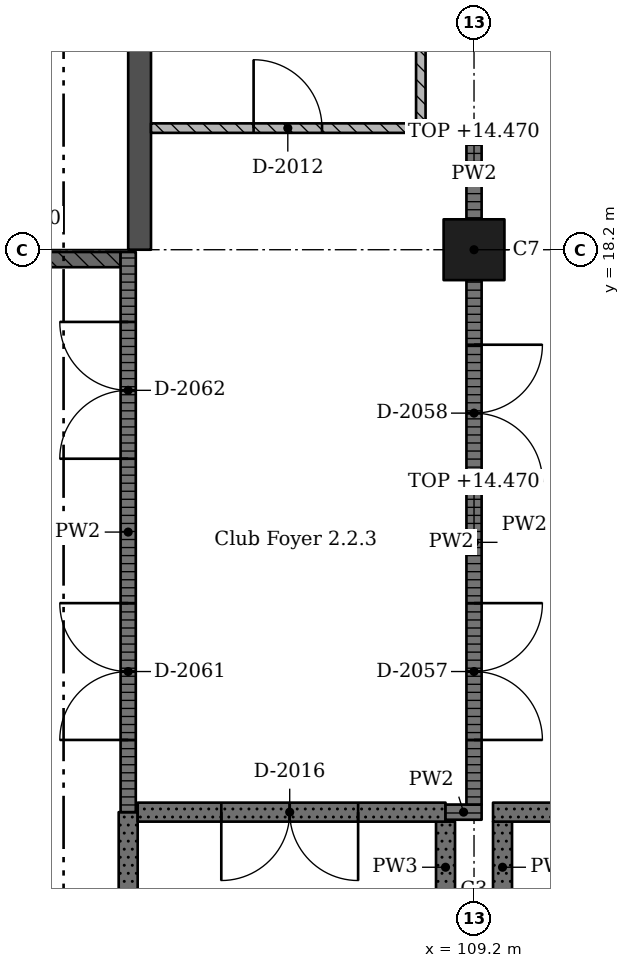
"""IFC4 building model, lengths in metres.
Left out: names, types, materials, properties, quantities, classifications, styles, units other than length and angle.
Written with IfcOpenShell. Run it as: python <this file> out.ifc"""

import sys

from ifc_helpers import new_model, si_unit, direction, frame, frame_2d, origin, origin_2d, place, context, subcontext, project, spatial, rectangle, extrude, element, fill, save


model = new_model("IFC4")
c1 = context("Model", 3, precision=1e-05, world=origin(), true_north=direction((0.0, 1.0)))
c2 = subcontext(c1, "Body", "Model", "MODEL_VIEW")
j1 = project(units=[si_unit("LENGTHUNIT", "METRE"), si_unit("PLANEANGLEUNIT", "RADIAN")], contexts=[c1])
p1 = place(None, origin())
s1 = spatial("IfcSite", under=j1, at=p1, CompositionType="ELEMENT")
p2 = place(p1, origin())
s2 = spatial("IfcBuilding", under=s1, at=p2, CompositionType="ELEMENT")
p3 = place(p2, frame((0.0, 0.0, 10.92)))
s3 = spatial("IfcBuildingStorey", under=s2, at=p3, CompositionType="ELEMENT", Elevation=10.92)
p4 = place(p3, frame((109.2, 18.2, 0.0), z_axis=(0.0, 0.0, 1.0), x_axis=(1.0, 0.0, 0.0)))
e1 = element("IfcColumn", 1, at=p4, inside=s3, PredefinedType="COLUMN", context=c2, shape_type="SweptSolid", body=[
    extrude(rectangle(XDim=0.8, YDim=0.8, at=origin_2d()), origin(), (0.0, 0.0, 1.0), 4.55),
])
p5 = place(p3, frame((104.8, 40.95, 0.0), z_axis=(0.0, 0.0, 1.0), x_axis=(0.0, -1.0, 0.0)))
e2 = element("IfcWall", 2, at=p5, inside=s3, PredefinedType="SHEAR", context=c2, shape_type="SweptSolid", body=[
    extrude(rectangle(XDim=22.75, YDim=0.3, at=frame_2d((11.375, 0.0))), origin(), (0.0, 0.0, 1.0), 4.55),
])
p6 = place(p3, frame((104.65, 0.1, 0.0), z_axis=(0.0, 0.0, 1.0), x_axis=(0.0, 1.0, 0.0)))
e3 = element("IfcWall", 3, at=p6, inside=s3, PredefinedType="SOLIDWALL", context=c2, shape_type="SweptSolid", body=[
    extrude(rectangle(XDim=10.7, YDim=0.25, at=frame_2d((5.35, 0.0))), origin(), (0.0, 0.0, 1.0), 4.25),
])
p7 = place(p3, frame((104.65, 10.8, 0.0), z_axis=(0.0, 0.0, 1.0), x_axis=(0.0, 1.0, 0.0)))
e4 = element("IfcWall", 4, at=p7, inside=s3, PredefinedType="PARTITIONING", context=c2, shape_type="SweptSolid", body=[
    extrude(rectangle(XDim=7.37, YDim=0.2, at=frame_2d((3.685, 0.0))), origin(), (0.0, 0.0, 1.0), 4.25),
])
p8 = place(p7, frame((0.95, 0.0, 0.0)))
e5 = element("IfcOpeningElement", 5, at=p8, cuts=e4, PredefinedType="OPENING", context=c2, shape_type="SweptSolid", body=[
    extrude(rectangle(XDim=1.8, YDim=2.4, at=frame_2d((0.9, 1.2))), frame((0.0, 0.11, 0.0), z_axis=(0.0, -1.0, 0.0), x_axis=(1.0, 0.0, 0.0)), (0.0, 0.0, 1.0), 0.22),
])
p9 = place(p7, frame((4.65, 0.0, 0.0)))
e6 = element("IfcOpeningElement", 6, at=p9, cuts=e4, PredefinedType="OPENING", context=c2, shape_type="SweptSolid", body=[
    extrude(rectangle(XDim=1.8, YDim=2.4, at=frame_2d((0.9, 1.2))), frame((0.0, 0.11, 0.0), z_axis=(0.0, -1.0, 0.0), x_axis=(1.0, 0.0, 0.0)), (0.0, 0.0, 1.0), 0.22),
])
p10 = place(p3, frame((104.95, 19.8, 0.0), z_axis=(0.0, 0.0, 1.0), x_axis=(1.0, 0.0, 0.0)))
e7 = element("IfcWall", 7, at=p10, inside=s3, PredefinedType="PARTITIONING", context=c2, shape_type="SweptSolid", body=[
    extrude(rectangle(XDim=3.613, YDim=0.125, at=frame_2d((1.806, 0.0))), origin(), (0.0, 0.0, 1.0), 4.25),
])
p11 = place(p10, frame((1.35, 0.0, 0.0)))
e8 = element("IfcOpeningElement", 8, at=p11, cuts=e7, PredefinedType="OPENING", context=c2, shape_type="SweptSolid", body=[
    extrude(rectangle(XDim=0.9, YDim=2.1, at=frame_2d((0.45, 1.05))), frame((0.0, 0.073, 0.0), z_axis=(0.0, -1.0, 0.0), x_axis=(1.0, 0.0, 0.0)), (0.0, 0.0, 1.0), 0.145),
])
p12 = place(p3, frame((108.5, 19.863, 0.0), z_axis=(0.0, 0.0, 1.0), x_axis=(0.0, 1.0, 0.0)))
e9 = element("IfcWall", 9, at=p12, inside=s3, PredefinedType="PARTITIONING", context=c2, shape_type="SweptSolid", body=[
    extrude(rectangle(XDim=7.0, YDim=0.125, at=frame_2d((3.5, 0.0))), origin(), (0.0, 0.0, 1.0), 4.25),
])
p13 = place(p3, frame((108.825, 9.475, 0.0), z_axis=(0.0, 0.0, 1.0), x_axis=(0.0, 1.0, 0.0)))
e10 = element("IfcWall", 10, at=p13, inside=s3, PredefinedType="SOLIDWALL", context=c2, shape_type="SweptSolid", body=[
    extrude(rectangle(XDim=1.2, YDim=0.25, at=frame_2d((0.6, 0.0))), origin(), (0.0, 0.0, 1.0), 4.25),
])
p14 = place(p3, frame((108.825, 10.8, 0.0), z_axis=(0.0, 0.0, 1.0), x_axis=(-1.0, 0.0, 0.0)))
e11 = element("IfcWall", 11, at=p14, inside=s3, PredefinedType="SOLIDWALL", context=c2, shape_type="SweptSolid", body=[
    extrude(rectangle(XDim=4.05, YDim=0.25, at=frame_2d((2.025, 0.0))), origin(), (0.0, 0.0, 1.0), 4.25),
])
p15 = place(p14, frame((1.15, 0.0, 0.0)))
e12 = element("IfcOpeningElement", 12, at=p15, cuts=e11, PredefinedType="OPENING", context=c2, shape_type="SweptSolid", body=[
    extrude(rectangle(XDim=1.8, YDim=2.1, at=frame_2d((0.9, 1.05))), frame((0.0, 0.135, 0.0), z_axis=(0.0, -1.0, 0.0), x_axis=(1.0, 0.0, 0.0)), (0.0, 0.0, 1.0), 0.27),
])
p16 = place(p3, frame((108.825, 10.8, 0.0), z_axis=(0.0, 0.0, 1.0), x_axis=(1.0, 0.0, 0.0)))
e13 = element("IfcWall", 13, at=p16, inside=s3, PredefinedType="PARTITIONING", context=c2, shape_type="SweptSolid", body=[
    extrude(rectangle(XDim=0.475, YDim=0.2, at=frame_2d((0.238, 0.0))), origin(), (0.0, 0.0, 1.0), 4.25),
])
p17 = place(p3, frame((109.2, 10.9, 0.0), z_axis=(0.0, 0.0, 1.0), x_axis=(0.0, 1.0, 0.0)))
e14 = element("IfcWall", 14, at=p17, inside=s3, PredefinedType="PARTITIONING", context=c2, shape_type="SweptSolid", body=[
    extrude(rectangle(XDim=6.9, YDim=0.2, at=frame_2d((3.45, 0.0))), origin(), (0.0, 0.0, 1.0), 3.55),
])
p18 = place(p17, frame((0.85, 0.0, 0.0)))
e15 = element("IfcOpeningElement", 15, at=p18, cuts=e14, PredefinedType="OPENING", context=c2, shape_type="SweptSolid", body=[
    extrude(rectangle(XDim=1.8, YDim=2.4, at=frame_2d((0.9, 1.2))), frame((0.0, 0.11, 0.0), z_axis=(0.0, -1.0, 0.0), x_axis=(1.0, 0.0, 0.0)), (0.0, 0.0, 1.0), 0.22),
])
p19 = place(p17, frame((4.25, 0.0, 0.0)))
e16 = element("IfcOpeningElement", 16, at=p19, cuts=e14, PredefinedType="OPENING", context=c2, shape_type="SweptSolid", body=[
    extrude(rectangle(XDim=1.8, YDim=2.4, at=frame_2d((0.9, 1.2))), frame((0.0, 0.11, 0.0), z_axis=(0.0, -1.0, 0.0), x_axis=(1.0, 0.0, 0.0)), (0.0, 0.0, 1.0), 0.22),
])
p20 = place(p3, frame((109.2, 18.6, 0.0), z_axis=(0.0, 0.0, 1.0), x_axis=(0.0, 1.0, 0.0)))
e17 = element("IfcWall", 17, at=p20, inside=s3, PredefinedType="PARTITIONING", context=c2, shape_type="SweptSolid", body=[
    extrude(rectangle(XDim=1.2, YDim=0.2, at=frame_2d((0.6, 0.0))), origin(), (0.0, 0.0, 1.0), 3.55),
])
p21 = place(p3, frame((109.575, 10.675, 0.0), z_axis=(0.0, 0.0, 1.0), x_axis=(0.0, -1.0, 0.0)))
e18 = element("IfcWall", 18, at=p21, inside=s3, PredefinedType="SOLIDWALL", context=c2, shape_type="SweptSolid", body=[
    extrude(rectangle(XDim=1.2, YDim=0.25, at=frame_2d((0.6, 0.0))), origin(), (0.0, 0.0, 1.0), 4.25),
])
p22 = place(p3, frame((112.17, 10.8, 0.0), z_axis=(0.0, 0.0, 1.0), x_axis=(-1.0, 0.0, 0.0)))
e19 = element("IfcWall", 19, at=p22, inside=s3, PredefinedType="SOLIDWALL", context=c2, shape_type="SweptSolid", body=[
    extrude(rectangle(XDim=2.72, YDim=0.25, at=frame_2d((1.36, 0.0))), origin(), (0.0, 0.0, 1.0), 4.25),
])
p23 = place(p3, frame((100.4, 18.07, 0.0), z_axis=(0.0, 0.0, 1.0), x_axis=(1.0, 0.0, 0.0)))
e20 = element("IfcWall", 20, at=p23, inside=s3, PredefinedType="PARTITIONING", context=c2, shape_type="SweptSolid", body=[
    extrude(rectangle(XDim=4.15, YDim=0.2, at=frame_2d((2.075, 0.0))), origin(), (0.0, 0.0, 1.0), 3.55),
])
p24 = place(p23, frame((1.075, 0.0, 1.1)))
e21 = element("IfcOpeningElement", 21, at=p24, cuts=e20, PredefinedType="OPENING", context=c2, shape_type="SweptSolid", body=[
    extrude(rectangle(XDim=2.0, YDim=2.0, at=frame_2d((1.0, 1.0))), frame((0.0, 0.11, 0.0), z_axis=(0.0, -1.0, 0.0), x_axis=(1.0, 0.0, 0.0)), (0.0, 0.0, 1.0), 0.22),
])
p25 = place(p11, origin())
e22 = element("IfcDoor", 22, at=p25, inside=s3, OperationType="SINGLE_SWING_RIGHT", PredefinedType="DOOR", context=c2, shape_type="SweptSolid", body=[
    extrude(rectangle(XDim=0.9, YDim=2.1, at=frame_2d((0.45, 1.05))), frame((0.0, 0.025, 0.0), z_axis=(0.0, -1.0, 0.0), x_axis=(1.0, 0.0, 0.0)), (0.0, 0.0, 1.0), 0.05),
])
fill(e8, e22)
p26 = place(p15, origin())
e23 = element("IfcDoor", 23, at=p26, inside=s3, OperationType="DOUBLE_DOOR_SINGLE_SWING", PredefinedType="DOOR", context=c2, shape_type="SweptSolid", body=[
    extrude(rectangle(XDim=1.8, YDim=2.1, at=frame_2d((0.9, 1.05))), frame((0.0, 0.025, 0.0), z_axis=(0.0, -1.0, 0.0), x_axis=(1.0, 0.0, 0.0)), (0.0, 0.0, 1.0), 0.05),
])
fill(e12, e23)
p27 = place(p18, origin())
e24 = element("IfcDoor", 24, at=p27, inside=s3, OperationType="DOUBLE_DOOR_SINGLE_SWING", PredefinedType="DOOR", context=c2, shape_type="SweptSolid", body=[
    extrude(rectangle(XDim=1.8, YDim=2.4, at=frame_2d((0.9, 1.2))), frame((0.0, 0.025, 0.0), z_axis=(0.0, -1.0, 0.0), x_axis=(1.0, 0.0, 0.0)), (0.0, 0.0, 1.0), 0.05),
])
fill(e15, e24)
p28 = place(p19, origin())
e25 = element("IfcDoor", 25, at=p28, inside=s3, OperationType="DOUBLE_DOOR_SINGLE_SWING", PredefinedType="DOOR", context=c2, shape_type="SweptSolid", body=[
    extrude(rectangle(XDim=1.8, YDim=2.4, at=frame_2d((0.9, 1.2))), frame((0.0, 0.025, 0.0), z_axis=(0.0, -1.0, 0.0), x_axis=(1.0, 0.0, 0.0)), (0.0, 0.0, 1.0), 0.05),
])
fill(e16, e25)
p29 = place(p8, origin())
e26 = element("IfcDoor", 26, at=p29, inside=s3, OperationType="DOUBLE_DOOR_SINGLE_SWING", PredefinedType="DOOR", context=c2, shape_type="SweptSolid", body=[
    extrude(rectangle(XDim=1.8, YDim=2.4, at=frame_2d((0.9, 1.2))), frame((0.0, 0.025, 0.0), z_axis=(0.0, -1.0, 0.0), x_axis=(1.0, 0.0, 0.0)), (0.0, 0.0, 1.0), 0.05),
])
fill(e5, e26)
p30 = place(p9, origin())
e27 = element("IfcDoor", 27, at=p30, inside=s3, OperationType="DOUBLE_DOOR_SINGLE_SWING", PredefinedType="DOOR", context=c2, shape_type="SweptSolid", body=[
    extrude(rectangle(XDim=1.8, YDim=2.4, at=frame_2d((0.9, 1.2))), frame((0.0, 0.025, 0.0), z_axis=(0.0, -1.0, 0.0), x_axis=(1.0, 0.0, 0.0)), (0.0, 0.0, 1.0), 0.05),
])
fill(e6, e27)
save(model, sys.argv[1])
